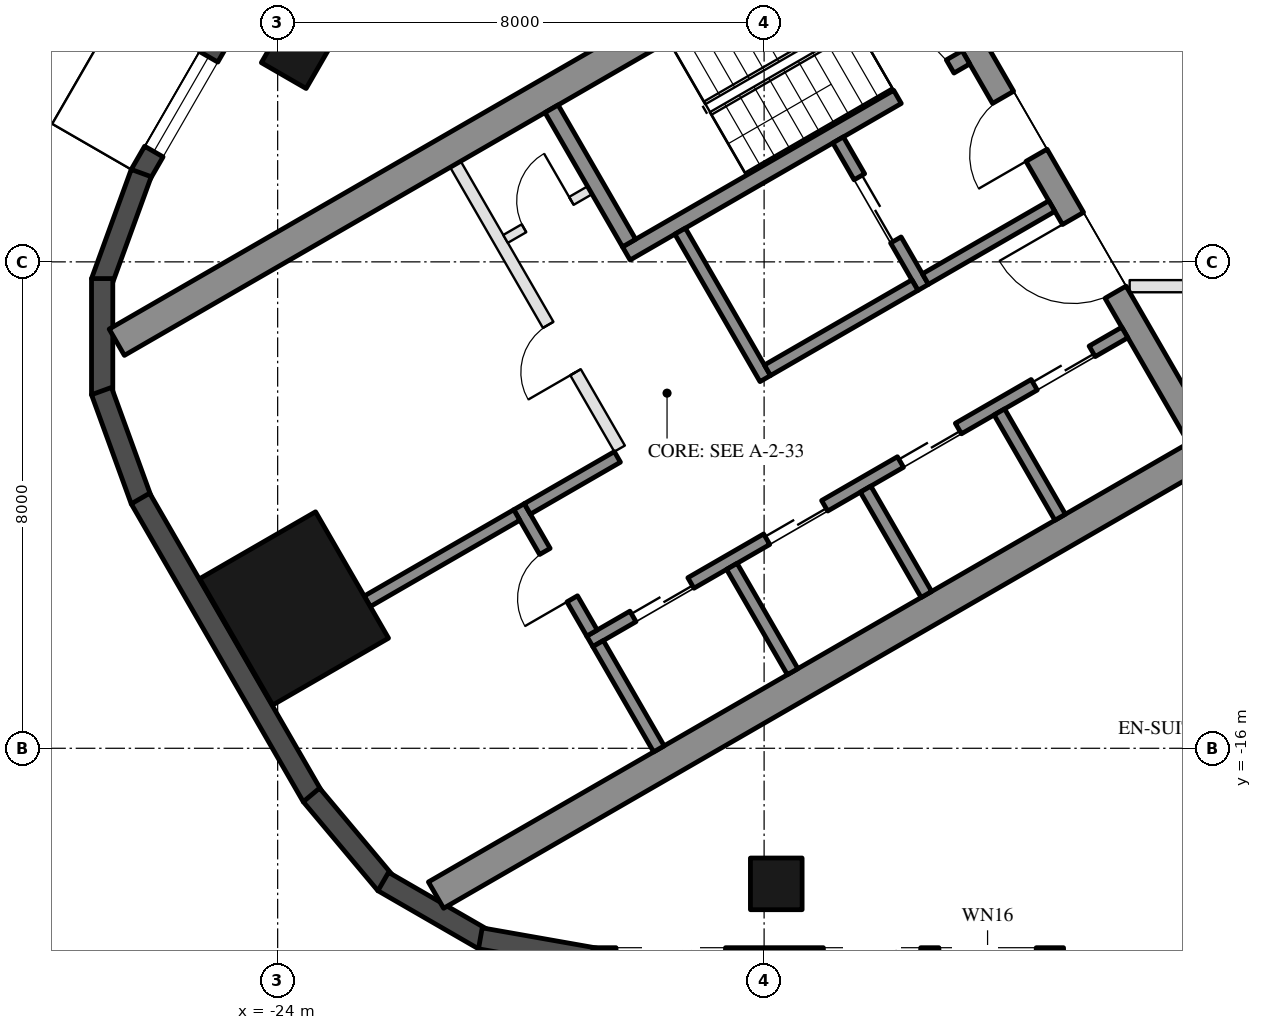
"""IFC4 building model, lengths in metres.
Left out: names, types, materials, properties, quantities, classifications, styles, units other than length and angle.
Written with IfcOpenShell. Run it as: python <this file> out.ifc"""

import sys

from ifc_helpers import new_model, si_unit, direction, frame, frame_2d, origin, origin_2d, place, context, subcontext, project, spatial, rectangle, hollow_rectangle, extrude, element, fill, save


model = new_model("IFC4")
c1 = context("Model", 3, precision=1e-05, world=origin(), true_north=direction((0.0, 1.0)))
c2 = subcontext(c1, "Body", "Model", "MODEL_VIEW")
j1 = project(units=[si_unit("LENGTHUNIT", "METRE"), si_unit("PLANEANGLEUNIT", "RADIAN")], contexts=[c1])
p1 = place(None, origin())
s1 = spatial("IfcSite", under=j1, at=p1, CompositionType="ELEMENT")
p2 = place(p1, origin())
s2 = spatial("IfcBuilding", under=s1, at=p2, CompositionType="ELEMENT")
p3 = place(p2, frame((0.0, 0.0, 146.6)))
s3 = spatial("IfcBuildingStorey", under=s2, at=p3, CompositionType="ELEMENT", Elevation=146.6)
for number, where, z_axis, x_axis in (
    (1, (-15.8, -18.23, 0.0), (0.0, 0.0, 1.0), (-1.0, 0.0, 0.0)),
    (2, (-23.688, -4.568, 0.0), (0.0, 0.0, 1.0), (0.5, 0.866, 0.0)),
):
    element("IfcColumn", number, at=place(p3, frame(where, z_axis=z_axis, x_axis=x_axis)), inside=s3, PredefinedType="COLUMN", context=c2, shape_type="SweptSolid", body=[
        extrude(hollow_rectangle(XDim=0.85, YDim=0.85, WallThickness=0.04, at=origin_2d()), origin(), (0.0, 0.0, 1.0), 3.7),
    ])
p4 = place(p3, frame((-23.729, -13.7, 0.0), z_axis=(0.0, 0.0, 1.0), x_axis=(-0.5, 0.866025403784, 0.0)))
e3 = element("IfcColumn", 3, at=p4, inside=s3, PredefinedType="COLUMN", context=c2, shape_type="SweptSolid", body=[
    extrude(hollow_rectangle(XDim=2.4, YDim=2.2, WallThickness=0.06, at=origin_2d()), origin(), (0.0, 0.0, 1.0), 3.7),
])
p5 = place(p3, frame((-24.299, -3.176, 0.0), z_axis=(0.0, 0.0, 1.0), x_axis=(-0.500028278809, -0.866009076391, 0.0)))
e4 = element("IfcWall", 4, at=p5, inside=s3, PredefinedType="SOLIDWALL", context=c2, shape_type="SweptSolid", body=[
    extrude(rectangle(XDim=3.916, YDim=0.35, at=frame_2d((1.958, 0.0))), origin(), (0.0, 0.0, 1.0), 3.55),
])
p6 = place(p5, frame((1.675, 0.0, 0.3)))
e5 = element("IfcOpeningElement", 5, at=p6, cuts=e4, PredefinedType="OPENING", context=c2, shape_type="SweptSolid", body=[
    extrude(rectangle(XDim=1.8, YDim=2.65, at=frame_2d((0.9, 1.325))), frame((0.0, 0.185, 0.0), z_axis=(0.0, -1.0, 0.0), x_axis=(1.0, 0.0, 0.0)), (0.0, 0.0, 1.0), 0.37),
])
for number, where, z_axis, x_axis in (
    (6, (-26.244, -6.54, 0.0), (0.0, 0.0, 1.0), (-0.342, -0.94, 0.0)),
    (7, (-26.886, -8.275, 0.0), (0.0, 0.0, 1.0), (0.0, -1.0, 0.0)),
    (8, (-26.897, -10.125, 0.0), (0.0, 0.0, 1.0), (0.342, -0.94, 0.0)),
):
    element("IfcWall", number, at=place(p3, frame(where, z_axis=z_axis, x_axis=x_axis)), inside=s3, PredefinedType="SOLIDWALL", context=c2, shape_type="SweptSolid", body=[
        extrude(rectangle(XDim=1.91, YDim=0.35, at=frame_2d((0.955, 0.0))), origin(), (0.0, 0.0, 1.0), 3.55),
    ])
p7 = place(p3, frame((-26.257, -11.893, 0.0), z_axis=(0.0, 0.0, 1.0), x_axis=(0.500018773155, -0.866014564827, 0.0)))
e9 = element("IfcWall", 9, at=p7, inside=s3, PredefinedType="SOLIDWALL", context=c2, shape_type="SweptSolid", body=[
    extrude(rectangle(XDim=5.658, YDim=0.35, at=frame_2d((2.829, 0.0))), origin(), (0.0, 0.0, 1.0), 3.55),
])
for number, where, z_axis, x_axis in (
    (10, (-23.445, -16.768, 0.0), (0.0, 0.0, 1.0), (0.643, -0.766, 0.0)),
    (11, (-22.264, -18.192, 0.0), (0.0, 0.0, 1.0), (0.866, -0.5, 0.0)),
):
    element("IfcWall", number, at=place(p3, frame(where, z_axis=z_axis, x_axis=x_axis)), inside=s3, PredefinedType="SOLIDWALL", context=c2, shape_type="SweptSolid", body=[
        extrude(rectangle(XDim=1.91, YDim=0.35, at=frame_2d((0.955, 0.0))), origin(), (0.0, 0.0, 1.0), 3.55),
    ])
p8 = place(p3, frame((-20.667, -19.126, 0.0), z_axis=(0.0, 0.0, 1.0), x_axis=(0.984798995425, -0.173697837091, 0.0)))
e12 = element("IfcWall", 12, at=p8, inside=s3, PredefinedType="SOLIDWALL", context=c2, shape_type="SweptSolid", body=[
    extrude(rectangle(XDim=1.91, YDim=0.35, at=frame_2d((0.955, 0.0))), origin(), (0.0, 0.0, 1.0), 3.55),
])
p9 = place(p3, frame((-18.816, -19.455, 0.0), z_axis=(0.0, 0.0, 1.0), x_axis=(1.0, 0.0, 0.0)))
e13 = element("IfcWall", 13, at=p9, inside=s3, PredefinedType="SOLIDWALL", context=c2, shape_type="SweptSolid", body=[
    extrude(rectangle(XDim=11.816, YDim=0.35, at=frame_2d((5.908, 0.0))), origin(), (0.0, 0.0, 1.0), 3.55),
])
p10 = place(p9, frame((0.381, 0.0, 0.3)))
e14 = element("IfcOpeningElement", 14, at=p10, cuts=e13, PredefinedType="OPENING", context=c2, shape_type="SweptSolid", body=[
    extrude(rectangle(XDim=1.8, YDim=2.65, at=frame_2d((0.9, 1.325))), frame((0.0, 0.185, 0.0), z_axis=(0.0, -1.0, 0.0), x_axis=(1.0, 0.0, 0.0)), (0.0, 0.0, 1.0), 0.37),
])
p11 = place(p9, frame((7.74, 0.0, 0.0)))
e15 = element("IfcOpeningElement", 15, at=p11, cuts=e13, PredefinedType="OPENING", context=c2, shape_type="SweptSolid", body=[
    extrude(rectangle(XDim=2.4, YDim=2.4, at=frame_2d((1.2, 1.2))), frame((0.0, 0.185, 0.0), z_axis=(0.0, -1.0, 0.0), x_axis=(1.0, 0.0, 0.0)), (0.0, 0.0, 1.0), 0.37),
])
p12 = place(p9, frame((3.791, 0.0, 0.3)))
e16 = element("IfcOpeningElement", 16, at=p12, cuts=e13, PredefinedType="OPENING", context=c2, shape_type="SweptSolid", body=[
    extrude(rectangle(XDim=1.6, YDim=2.65, at=frame_2d((0.8, 1.325))), frame((0.0, 0.185, 0.0), z_axis=(0.0, -1.0, 0.0), x_axis=(1.0, 0.0, 0.0)), (0.0, 0.0, 1.0), 0.37),
])
p13 = place(p9, frame((5.691, 0.0, 0.3)))
e17 = element("IfcOpeningElement", 17, at=p13, cuts=e13, PredefinedType="OPENING", context=c2, shape_type="SweptSolid", body=[
    extrude(rectangle(XDim=1.6, YDim=2.65, at=frame_2d((0.8, 1.325))), frame((0.0, 0.185, 0.0), z_axis=(0.0, -1.0, 0.0), x_axis=(1.0, 0.0, 0.0)), (0.0, 0.0, 1.0), 0.37),
])
for number, where, z_axis, x_axis in (
    (18, (-13.797, -1.903, 0.0), (0.0, 0.0, 1.0), (-0.866, -0.5, 0.0)),
    (19, (-8.547, -10.997, 0.0), (0.0, 0.0, 1.0), (-0.866, -0.5, 0.0)),
):
    element("IfcWall", number, at=place(p3, frame(where, z_axis=z_axis, x_axis=x_axis)), inside=s3, PredefinedType="SHEAR", context=c2, shape_type="SweptSolid", body=[
        extrude(rectangle(XDim=14.837, YDim=0.5, at=frame_2d((7.418, 0.0))), origin(), (0.0, 0.0, 1.0), 3.5),
    ])
p14 = place(p3, frame((-13.845, -2.22, 0.0), z_axis=(0.0, 0.0, 1.0), x_axis=(0.500004234368, -0.866022959057, 0.0)))
e20 = element("IfcWall", 20, at=p14, inside=s3, PredefinedType="SHEAR", context=c2, shape_type="SweptSolid", body=[
    extrude(rectangle(XDim=10.0, YDim=0.4, at=frame_2d((5.0, 0.0))), origin(), (0.0, 0.0, 1.0), 3.5),
])
p15 = place(p14, frame((3.55, 0.0, 0.0)))
e21 = element("IfcOpeningElement", 21, at=p15, cuts=e20, PredefinedType="OPENING", context=c2, shape_type="SweptSolid", body=[
    extrude(rectangle(XDim=1.1, YDim=2.1, at=frame_2d((0.55, 1.05))), frame((0.0, 0.21, 0.0), z_axis=(0.0, -1.0, 0.0), x_axis=(1.0, 0.0, 0.0)), (0.0, 0.0, 1.0), 0.42),
])
p16 = place(p14, frame((5.85, 0.0, 0.0)))
e22 = element("IfcOpeningElement", 22, at=p16, cuts=e20, PredefinedType="OPENING", context=c2, shape_type="SweptSolid", body=[
    extrude(rectangle(XDim=1.4, YDim=2.1, at=frame_2d((0.7, 1.05))), frame((0.0, 0.21, 0.0), z_axis=(0.0, -1.0, 0.0), x_axis=(1.0, 0.0, 0.0)), (0.0, 0.0, 1.0), 0.42),
])
p17 = place(p3, frame((-12.681, -4.636, 0.0), z_axis=(0.0, 0.0, 1.0), x_axis=(-0.866021702275, -0.500006411147, 0.0)))
e23 = element("IfcWall", 23, at=p17, inside=s3, PredefinedType="SHEAR", context=c2, shape_type="SweptSolid", body=[
    extrude(rectangle(XDim=6.45, YDim=0.25, at=frame_2d((3.225, 0.0))), origin(), (0.0, 0.0, 1.0), 3.5),
])
p18 = place(p17, frame((0.3, 0.0, 0.0)))
e24 = element("IfcOpeningElement", 24, at=p18, cuts=e23, PredefinedType="OPENING", context=c2, shape_type="SweptSolid", body=[
    extrude(rectangle(XDim=1.0, YDim=2.1, at=frame_2d((0.5, 1.05))), frame((0.0, 0.135, 0.0), z_axis=(0.0, -1.0, 0.0), x_axis=(1.0, 0.0, 0.0)), (0.0, 0.0, 1.0), 0.27),
])
p19 = place(p3, frame((-19.496, -5.482, 0.0), z_axis=(0.0, 0.0, 1.0), x_axis=(0.499990435942, -0.866030925526, 0.0)))
e25 = element("IfcWall", 25, at=p19, inside=s3, PredefinedType="SHEAR", context=c2, shape_type="SweptSolid", body=[
    extrude(rectangle(XDim=2.55, YDim=0.25, at=frame_2d((1.275, 0.0))), origin(), (0.0, 0.0, 1.0), 3.5),
])
p20 = place(p3, frame((-17.381, -7.495, 0.0), z_axis=(0.0, 0.0, 1.0), x_axis=(0.500011755427, -0.866018616679, 0.0)))
e26 = element("IfcWall", 26, at=p20, inside=s3, PredefinedType="SHEAR", context=c2, shape_type="SweptSolid", body=[
    extrude(rectangle(XDim=2.8, YDim=0.2, at=frame_2d((1.4, 0.0))), origin(), (0.0, 0.0, 1.0), 3.5),
])
p21 = place(p3, frame((-14.783, -5.995, 0.0), z_axis=(0.0, 0.0, 1.0), x_axis=(0.49994636267, -0.866056369097, 0.0)))
e27 = element("IfcWall", 27, at=p21, inside=s3, PredefinedType="SHEAR", context=c2, shape_type="SweptSolid", body=[
    extrude(rectangle(XDim=2.8, YDim=0.2, at=frame_2d((1.4, 0.0))), origin(), (0.0, 0.0, 1.0), 3.5),
])
p22 = place(p21, frame((0.7, 0.0, 0.0)))
e28 = element("IfcOpeningElement", 28, at=p22, cuts=e27, PredefinedType="OPENING", context=c2, shape_type="SweptSolid", body=[
    extrude(rectangle(XDim=1.2, YDim=2.1, at=frame_2d((0.6, 1.05))), frame((0.0, 0.11, 0.0), z_axis=(0.0, -1.0, 0.0), x_axis=(1.0, 0.0, 0.0)), (0.0, 0.0, 1.0), 0.22),
])
p23 = place(p3, frame((-13.52, -8.383, 0.0), z_axis=(0.0, 0.0, 1.0), x_axis=(-0.866034573852, -0.49998411664, 0.0)))
e29 = element("IfcWall", 29, at=p23, inside=s3, PredefinedType="SHEAR", context=c2, shape_type="SweptSolid", body=[
    extrude(rectangle(XDim=2.8, YDim=0.2, at=frame_2d((1.4, 0.0))), origin(), (0.0, 0.0, 1.0), 3.5),
])
p24 = place(p3, frame((-11.268, -7.083, 0.0), z_axis=(0.0, 0.0, 1.0), x_axis=(-0.866050077142, -0.499957262057, 0.0)))
e30 = element("IfcWall", 30, at=p24, inside=s3, PredefinedType="SHEAR", context=c2, shape_type="SweptSolid", body=[
    extrude(rectangle(XDim=2.4, YDim=0.2, at=frame_2d((1.2, 0.0))), origin(), (0.0, 0.0, 1.0), 3.5),
])
p25 = place(p3, frame((-10.068, -9.162, 0.0), z_axis=(0.0, 0.0, 1.0), x_axis=(-0.866032725843, -0.499987317609, 0.0)))
e31 = element("IfcWall", 31, at=p25, inside=s3, PredefinedType="SHEAR", context=c2, shape_type="SweptSolid", body=[
    extrude(rectangle(XDim=10.16, YDim=0.2, at=frame_2d((5.08, 0.0))), origin(), (0.0, 0.0, 1.0), 3.5),
])
p26 = place(p25, frame((0.62, 0.0, 0.0)))
e32 = element("IfcOpeningElement", 32, at=p26, cuts=e31, PredefinedType="OPENING", context=c2, shape_type="SweptSolid", body=[
    extrude(rectangle(XDim=1.1, YDim=2.1, at=frame_2d((0.55, 1.05))), frame((0.0, 0.11, 0.0), z_axis=(0.0, -1.0, 0.0), x_axis=(1.0, 0.0, 0.0)), (0.0, 0.0, 1.0), 0.22),
])
p27 = place(p25, frame((3.16, 0.0, 0.0)))
e33 = element("IfcOpeningElement", 33, at=p27, cuts=e31, PredefinedType="OPENING", context=c2, shape_type="SweptSolid", body=[
    extrude(rectangle(XDim=1.1, YDim=2.1, at=frame_2d((0.55, 1.05))), frame((0.0, 0.11, 0.0), z_axis=(0.0, -1.0, 0.0), x_axis=(1.0, 0.0, 0.0)), (0.0, 0.0, 1.0), 0.22),
])
p28 = place(p25, frame((5.7, 0.0, 0.0)))
e34 = element("IfcOpeningElement", 34, at=p28, cuts=e31, PredefinedType="OPENING", context=c2, shape_type="SweptSolid", body=[
    extrude(rectangle(XDim=1.1, YDim=2.1, at=frame_2d((0.55, 1.05))), frame((0.0, 0.11, 0.0), z_axis=(0.0, -1.0, 0.0), x_axis=(1.0, 0.0, 0.0)), (0.0, 0.0, 1.0), 0.22),
])
p29 = place(p25, frame((8.24, 0.0, 0.0)))
e35 = element("IfcOpeningElement", 35, at=p29, cuts=e31, PredefinedType="OPENING", context=c2, shape_type="SweptSolid", body=[
    extrude(rectangle(XDim=1.1, YDim=2.1, at=frame_2d((0.55, 1.05))), frame((0.0, 0.11, 0.0), z_axis=(0.0, -1.0, 0.0), x_axis=(1.0, 0.0, 0.0)), (0.0, 0.0, 1.0), 0.22),
])
p30 = place(p3, frame((-20.031, -12.026, 0.0), z_axis=(0.0, 0.0, 1.0), x_axis=(0.500033551112, -0.866006032174, 0.0)))
e36 = element("IfcWall", 36, at=p30, inside=s3, PredefinedType="SHEAR", context=c2, shape_type="SweptSolid", body=[
    extrude(rectangle(XDim=2.4, YDim=0.2, at=frame_2d((1.2, 0.0))), origin(), (0.0, 0.0, 1.0), 3.5),
])
p31 = place(p30, frame((0.85, 0.0, 0.0)))
e37 = element("IfcOpeningElement", 37, at=p31, cuts=e36, PredefinedType="OPENING", context=c2, shape_type="SweptSolid", body=[
    extrude(rectangle(XDim=0.9, YDim=2.1, at=frame_2d((0.45, 1.05))), frame((0.0, 0.11, 0.0), z_axis=(0.0, -1.0, 0.0), x_axis=(1.0, 0.0, 0.0)), (0.0, 0.0, 1.0), 0.22),
])
p32 = place(p3, frame((-18.413, -11.208, 0.0), z_axis=(0.0, 0.0, 1.0), x_axis=(-0.866038183914, -0.499977863513, 0.0)))
e38 = element("IfcWall", 38, at=p32, inside=s3, PredefinedType="SHEAR", context=c2, shape_type="SweptSolid", body=[
    extrude(rectangle(XDim=1.71, YDim=0.2, at=frame_2d((0.855, 0.0))), origin(), (0.0, 0.0, 1.0), 3.5),
])
for number, where, z_axis, x_axis in (
    (39, (-12.131, -10.468, 0.0), (0.0, 0.0, 1.0), (0.5, -0.866, 0.0)),
    (40, (-14.331, -11.738, 0.0), (0.0, 0.0, 1.0), (0.5, -0.866, 0.0)),
    (41, (-16.531, -13.008, 0.0), (0.0, 0.0, 1.0), (0.5, -0.866, 0.0)),
    (42, (-18.73, -14.278, 0.0), (0.0, 0.0, 1.0), (0.5, -0.866, 0.0)),
):
    element("IfcWall", number, at=place(p3, frame(where, z_axis=z_axis, x_axis=x_axis)), inside=s3, PredefinedType="SHEAR", context=c2, shape_type="SweptSolid", body=[
        extrude(rectangle(XDim=2.0, YDim=0.2, at=frame_2d((1.0, 0.0))), origin(), (0.0, 0.0, 1.0), 3.5),
    ])
p33 = place(p3, frame((-20.067, -12.163, 0.0), z_axis=(0.0, 0.0, 1.0), x_axis=(-0.866055327414, -0.49994816717, 0.0)))
e43 = element("IfcWall", 43, at=p33, inside=s3, PredefinedType="SHEAR", context=c2, shape_type="SweptSolid", body=[
    extrude(rectangle(XDim=2.84, YDim=0.2, at=frame_2d((1.42, 0.0))), origin(), (0.0, 0.0, 1.0), 3.5),
])
p34 = place(p3, frame((-21.076, -6.395, 0.0), z_axis=(0.0, 0.0, 1.0), x_axis=(0.50001468107, -0.866016927499, 0.0)))
e44 = element("IfcWall", 44, at=p34, inside=s3, PredefinedType="PARTITIONING", context=c2, shape_type="SweptSolid", body=[
    extrude(rectangle(XDim=5.4, YDim=0.2, at=frame_2d((2.7, 0.0))), origin(), (0.0, 0.0, 1.0), 3.5),
])
p35 = place(p34, frame((3.05, 0.0, 0.0)))
e45 = element("IfcOpeningElement", 45, at=p35, cuts=e44, PredefinedType="OPENING", context=c2, shape_type="SweptSolid", body=[
    extrude(rectangle(XDim=0.9, YDim=2.1, at=frame_2d((0.45, 1.05))), frame((0.0, 0.11, 0.0), z_axis=(0.0, -1.0, 0.0), x_axis=(1.0, 0.0, 0.0)), (0.0, 0.0, 1.0), 0.22),
])
p36 = place(p3, frame((-18.866, -6.822, 0.0), z_axis=(0.0, 0.0, 1.0), x_axis=(-0.866028054938, -0.499995408039, 0.0)))
e46 = element("IfcWall", 46, at=p36, inside=s3, PredefinedType="PARTITIONING", context=c2, shape_type="SweptSolid", body=[
    extrude(rectangle(XDim=1.6, YDim=0.15, at=frame_2d((0.8, 0.0))), origin(), (0.0, 0.0, 1.0), 3.5),
])
p37 = place(p36, frame((0.35, 0.0, 0.0)))
e47 = element("IfcOpeningElement", 47, at=p37, cuts=e46, PredefinedType="OPENING", context=c2, shape_type="SweptSolid", body=[
    extrude(rectangle(XDim=0.9, YDim=2.1, at=frame_2d((0.45, 1.05))), frame((0.0, 0.085, 0.0), z_axis=(0.0, -1.0, 0.0), x_axis=(1.0, 0.0, 0.0)), (0.0, 0.0, 1.0), 0.17),
])
p38 = place(p3, frame((-6.206, -8.4, 0.0), z_axis=(0.0, 0.0, 1.0), x_axis=(-1.0, 0.0, 0.0)))
e48 = element("IfcWall", 48, at=p38, inside=s3, PredefinedType="PARTITIONING", context=c2, shape_type="SweptSolid", body=[
    extrude(rectangle(XDim=3.782, YDim=0.2, at=frame_2d((1.891, 0.0))), origin(), (0.0, 0.0, 1.0), 2.95),
])
p39 = place(p38, frame((1.391, 0.0, 0.0)))
e49 = element("IfcOpeningElement", 49, at=p39, cuts=e48, PredefinedType="OPENING", context=c2, shape_type="SweptSolid", body=[
    extrude(rectangle(XDim=1.0, YDim=2.1, at=frame_2d((0.5, 1.05))), frame((0.0, 0.11, 0.0), z_axis=(0.0, -1.0, 0.0), x_axis=(1.0, 0.0, 0.0)), (0.0, 0.0, 1.0), 0.22),
])
p40 = place(p6, origin())
e50 = element("IfcWindow", 50, at=p40, inside=s3, PartitioningType="SINGLE_PANEL", PredefinedType="WINDOW", context=c2, shape_type="SweptSolid", body=[
    extrude(rectangle(XDim=1.8, YDim=2.65, at=frame_2d((0.9, 1.325))), frame((0.0, 0.03, 0.0), z_axis=(0.0, -1.0, 0.0), x_axis=(1.0, 0.0, 0.0)), (0.0, 0.0, 1.0), 0.06),
])
fill(e5, e50)
p41 = place(p22, origin())
e51 = element("IfcDoor", 51, at=p41, inside=s3, OperationType="DOUBLE_DOOR_SLIDING", PredefinedType="DOOR", context=c2, shape_type="SweptSolid", body=[
    extrude(rectangle(XDim=1.2, YDim=2.1, at=frame_2d((0.6, 1.05))), frame((0.0, 0.025, 0.0), z_axis=(0.0, -1.0, 0.0), x_axis=(1.0, 0.0, 0.0)), (0.0, 0.0, 1.0), 0.05),
])
fill(e28, e51)
p42 = place(p37, frame((0.9, 0.0, 0.0), z_axis=(0.0, 0.0, 1.0), x_axis=(-1.0, 0.0, 0.0)))
e52 = element("IfcDoor", 52, at=p42, inside=s3, OperationType="SINGLE_SWING_RIGHT", PredefinedType="DOOR", context=c2, shape_type="SweptSolid", body=[
    extrude(rectangle(XDim=0.9, YDim=2.1, at=frame_2d((0.45, 1.05))), frame((0.0, 0.025, 0.0), z_axis=(0.0, -1.0, 0.0), x_axis=(1.0, 0.0, 0.0)), (0.0, 0.0, 1.0), 0.05),
])
fill(e47, e52)
p43 = place(p26, origin())
e53 = element("IfcDoor", 53, at=p43, inside=s3, OperationType="DOUBLE_DOOR_SLIDING", PredefinedType="DOOR", context=c2, shape_type="SweptSolid", body=[
    extrude(rectangle(XDim=1.1, YDim=2.1, at=frame_2d((0.55, 1.05))), frame((0.0, 0.025, 0.0), z_axis=(0.0, -1.0, 0.0), x_axis=(1.0, 0.0, 0.0)), (0.0, 0.0, 1.0), 0.05),
])
fill(e32, e53)
p44 = place(p27, origin())
e54 = element("IfcDoor", 54, at=p44, inside=s3, OperationType="DOUBLE_DOOR_SLIDING", PredefinedType="DOOR", context=c2, shape_type="SweptSolid", body=[
    extrude(rectangle(XDim=1.1, YDim=2.1, at=frame_2d((0.55, 1.05))), frame((0.0, 0.025, 0.0), z_axis=(0.0, -1.0, 0.0), x_axis=(1.0, 0.0, 0.0)), (0.0, 0.0, 1.0), 0.05),
])
fill(e33, e54)
p45 = place(p28, origin())
e55 = element("IfcDoor", 55, at=p45, inside=s3, OperationType="DOUBLE_DOOR_SLIDING", PredefinedType="DOOR", context=c2, shape_type="SweptSolid", body=[
    extrude(rectangle(XDim=1.1, YDim=2.1, at=frame_2d((0.55, 1.05))), frame((0.0, 0.025, 0.0), z_axis=(0.0, -1.0, 0.0), x_axis=(1.0, 0.0, 0.0)), (0.0, 0.0, 1.0), 0.05),
])
fill(e34, e55)
p46 = place(p29, origin())
e56 = element("IfcDoor", 56, at=p46, inside=s3, OperationType="DOUBLE_DOOR_SLIDING", PredefinedType="DOOR", context=c2, shape_type="SweptSolid", body=[
    extrude(rectangle(XDim=1.1, YDim=2.1, at=frame_2d((0.55, 1.05))), frame((0.0, 0.025, 0.0), z_axis=(0.0, -1.0, 0.0), x_axis=(1.0, 0.0, 0.0)), (0.0, 0.0, 1.0), 0.05),
])
fill(e35, e56)
p47 = place(p31, frame((0.9, 0.0, 0.0), z_axis=(0.0, 0.0, 1.0), x_axis=(-1.0, 0.0, 0.0)))
e57 = element("IfcDoor", 57, at=p47, inside=s3, OperationType="SINGLE_SWING_LEFT", PredefinedType="DOOR", context=c2, shape_type="SweptSolid", body=[
    extrude(rectangle(XDim=0.9, YDim=2.1, at=frame_2d((0.45, 1.05))), frame((0.0, 0.025, 0.0), z_axis=(0.0, -1.0, 0.0), x_axis=(1.0, 0.0, 0.0)), (0.0, 0.0, 1.0), 0.05),
])
fill(e37, e57)
p48 = place(p35, frame((0.9, 0.0, 0.0), z_axis=(0.0, 0.0, 1.0), x_axis=(-1.0, 0.0, 0.0)))
e58 = element("IfcDoor", 58, at=p48, inside=s3, OperationType="SINGLE_SWING_LEFT", PredefinedType="DOOR", context=c2, shape_type="SweptSolid", body=[
    extrude(rectangle(XDim=0.9, YDim=2.1, at=frame_2d((0.45, 1.05))), frame((0.0, 0.025, 0.0), z_axis=(0.0, -1.0, 0.0), x_axis=(1.0, 0.0, 0.0)), (0.0, 0.0, 1.0), 0.05),
])
fill(e45, e58)
p49 = place(p15, frame((1.1, 0.0, 0.0), z_axis=(0.0, 0.0, 1.0), x_axis=(-1.0, 0.0, 0.0)))
e59 = element("IfcDoor", 59, at=p49, inside=s3, OperationType="SINGLE_SWING_LEFT", PredefinedType="DOOR", context=c2, shape_type="SweptSolid", body=[
    extrude(rectangle(XDim=1.1, YDim=2.1, at=frame_2d((0.55, 1.05))), frame((0.0, 0.025, 0.0), z_axis=(0.0, -1.0, 0.0), x_axis=(1.0, 0.0, 0.0)), (0.0, 0.0, 1.0), 0.05),
])
fill(e21, e59)
p50 = place(p16, frame((1.4, 0.0, 0.0), z_axis=(0.0, 0.0, 1.0), x_axis=(-1.0, 0.0, 0.0)))
e60 = element("IfcDoor", 60, at=p50, inside=s3, OperationType="DOUBLE_DOOR_SINGLE_SWING", PredefinedType="DOOR", context=c2, shape_type="SweptSolid", body=[
    extrude(rectangle(XDim=1.4, YDim=2.1, at=frame_2d((0.7, 1.05))), frame((0.0, 0.025, 0.0), z_axis=(0.0, -1.0, 0.0), x_axis=(1.0, 0.0, 0.0)), (0.0, 0.0, 1.0), 0.05),
])
fill(e22, e60)
p51 = place(p18, frame((1.0, 0.0, 0.0), z_axis=(0.0, 0.0, 1.0), x_axis=(-1.0, 0.0, 0.0)))
e61 = element("IfcDoor", 61, at=p51, inside=s3, OperationType="SINGLE_SWING_LEFT", PredefinedType="DOOR", context=c2, shape_type="SweptSolid", body=[
    extrude(rectangle(XDim=1.0, YDim=2.1, at=frame_2d((0.5, 1.05))), frame((0.0, 0.025, 0.0), z_axis=(0.0, -1.0, 0.0), x_axis=(1.0, 0.0, 0.0)), (0.0, 0.0, 1.0), 0.05),
])
fill(e24, e61)
save(model, sys.argv[1])
